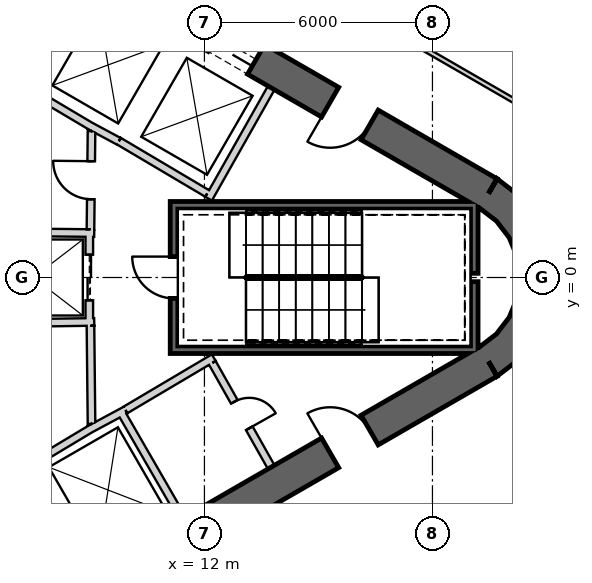
"""IFC4 building model, lengths in metres.
Left out: names, types, materials, properties, quantities, classifications, styles, units other than length and angle.
Written with IfcOpenShell. Run it as: python <this file> out.ifc"""

import sys

from ifc_helpers import new_model, si_unit, direction, frame, frame_2d, origin, place, context, subcontext, project, spatial, polyline, rectangle, outline, extrude, element, fill, save


model = new_model("IFC4")
c1 = context("Model", 3, precision=1e-05, world=origin(), true_north=direction((0.0, 1.0)))
c2 = subcontext(c1, "Body", "Model", "MODEL_VIEW")
j1 = project(units=[si_unit("LENGTHUNIT", "METRE"), si_unit("PLANEANGLEUNIT", "RADIAN")], contexts=[c1])
p1 = place(None, origin())
s1 = spatial("IfcSite", under=j1, at=p1, CompositionType="ELEMENT")
p2 = place(p1, origin())
s2 = spatial("IfcBuilding", under=s1, at=p2, CompositionType="ELEMENT")
p3 = place(p2, frame((0.0, 0.0, 33.5)))
s3 = spatial("IfcBuildingStorey", under=s2, at=p3, CompositionType="ELEMENT", Elevation=33.5)
p4 = place(p3, frame((19.475, 2.208, 0.0), z_axis=(0.0, 0.0, 1.0), x_axis=(-0.866028369851, 0.499994862586, 0.0)))
e1 = element("IfcWall", 1, at=p4, inside=s3, PredefinedType="SHEAR", context=c2, shape_type="SweptSolid", body=[
    extrude(rectangle(XDim=31.523, YDim=0.9, at=frame_2d((15.762, 0.0))), origin(), (0.0, 0.0, 1.0), 6.0),
])
p5 = place(p4, frame((7.062, 0.0, 0.0)))
e2 = element("IfcOpeningElement", 2, at=p5, cuts=e1, PredefinedType="OPENING", context=c2, shape_type="SweptSolid", body=[
    extrude(rectangle(XDim=1.2, YDim=2.4, at=frame_2d((0.6, 1.2))), frame((0.0, 0.46, 0.0), z_axis=(0.0, -1.0, 0.0), x_axis=(1.0, 0.0, 0.0)), (0.0, 0.0, 1.0), 0.92),
])
p6 = place(p4, frame((9.762, 0.0, 0.0)))
e3 = element("IfcOpeningElement", 3, at=p6, cuts=e1, PredefinedType="OPENING", context=c2, shape_type="SweptSolid", body=[
    extrude(rectangle(XDim=1.2, YDim=2.4, at=frame_2d((0.6, 1.2))), frame((0.0, 0.46, 0.0), z_axis=(0.0, -1.0, 0.0), x_axis=(1.0, 0.0, 0.0)), (0.0, 0.0, 1.0), 0.92),
])
p7 = place(p4, frame((12.462, 0.0, 0.0)))
e4 = element("IfcOpeningElement", 4, at=p7, cuts=e1, PredefinedType="OPENING", context=c2, shape_type="SweptSolid", body=[
    extrude(rectangle(XDim=1.2, YDim=2.4, at=frame_2d((0.6, 1.2))), frame((0.0, 0.46, 0.0), z_axis=(0.0, -1.0, 0.0), x_axis=(1.0, 0.0, 0.0)), (0.0, 0.0, 1.0), 0.92),
])
p8 = place(p4, frame((15.162, 0.0, 0.0)))
e5 = element("IfcOpeningElement", 5, at=p8, cuts=e1, PredefinedType="OPENING", context=c2, shape_type="SweptSolid", body=[
    extrude(rectangle(XDim=1.2, YDim=2.4, at=frame_2d((0.6, 1.2))), frame((0.0, 0.46, 0.0), z_axis=(0.0, -1.0, 0.0), x_axis=(1.0, 0.0, 0.0)), (0.0, 0.0, 1.0), 0.92),
])
p9 = place(p4, frame((17.862, 0.0, 0.0)))
e6 = element("IfcOpeningElement", 6, at=p9, cuts=e1, PredefinedType="OPENING", context=c2, shape_type="SweptSolid", body=[
    extrude(rectangle(XDim=1.2, YDim=2.4, at=frame_2d((0.6, 1.2))), frame((0.0, 0.46, 0.0), z_axis=(0.0, -1.0, 0.0), x_axis=(1.0, 0.0, 0.0)), (0.0, 0.0, 1.0), 0.92),
])
p10 = place(p4, frame((20.562, 0.0, 0.0)))
e7 = element("IfcOpeningElement", 7, at=p10, cuts=e1, PredefinedType="OPENING", context=c2, shape_type="SweptSolid", body=[
    extrude(rectangle(XDim=1.2, YDim=2.4, at=frame_2d((0.6, 1.2))), frame((0.0, 0.46, 0.0), z_axis=(0.0, -1.0, 0.0), x_axis=(1.0, 0.0, 0.0)), (0.0, 0.0, 1.0), 0.92),
])
p11 = place(p4, frame((23.262, 0.0, 0.0)))
e8 = element("IfcOpeningElement", 8, at=p11, cuts=e1, PredefinedType="OPENING", context=c2, shape_type="SweptSolid", body=[
    extrude(rectangle(XDim=1.2, YDim=2.4, at=frame_2d((0.6, 1.2))), frame((0.0, 0.46, 0.0), z_axis=(0.0, -1.0, 0.0), x_axis=(1.0, 0.0, 0.0)), (0.0, 0.0, 1.0), 0.92),
])
p12 = place(p4, frame((3.612, 0.0, 0.0)))
e9 = element("IfcOpeningElement", 9, at=p12, cuts=e1, PredefinedType="OPENING", context=c2, shape_type="SweptSolid", body=[
    extrude(rectangle(XDim=1.2, YDim=2.4, at=frame_2d((0.6, 1.2))), frame((0.0, 0.46, 0.0), z_axis=(0.0, -1.0, 0.0), x_axis=(1.0, 0.0, 0.0)), (0.0, 0.0, 1.0), 0.92),
])
p13 = place(p4, frame((26.712, 0.0, 0.0)))
e10 = element("IfcOpeningElement", 10, at=p13, cuts=e1, PredefinedType="OPENING", context=c2, shape_type="SweptSolid", body=[
    extrude(rectangle(XDim=1.2, YDim=2.4, at=frame_2d((0.6, 1.2))), frame((0.0, 0.46, 0.0), z_axis=(0.0, -1.0, 0.0), x_axis=(1.0, 0.0, 0.0)), (0.0, 0.0, 1.0), 0.92),
])
p14 = place(p3, frame((-7.825, -17.97, 0.0), z_axis=(0.0, 0.0, 1.0), x_axis=(0.866028369851, 0.499994862586, 0.0)))
e11 = element("IfcWall", 11, at=p14, inside=s3, PredefinedType="SHEAR", context=c2, shape_type="SweptSolid", body=[
    extrude(rectangle(XDim=31.523, YDim=0.9, at=frame_2d((15.762, 0.0))), origin(), (0.0, 0.0, 1.0), 6.0),
])
p15 = place(p14, frame((7.062, 0.0, 0.0)))
e12 = element("IfcOpeningElement", 12, at=p15, cuts=e11, PredefinedType="OPENING", context=c2, shape_type="SweptSolid", body=[
    extrude(rectangle(XDim=1.2, YDim=2.4, at=frame_2d((0.6, 1.2))), frame((0.0, 0.46, 0.0), z_axis=(0.0, -1.0, 0.0), x_axis=(1.0, 0.0, 0.0)), (0.0, 0.0, 1.0), 0.92),
])
p16 = place(p14, frame((9.762, 0.0, 0.0)))
e13 = element("IfcOpeningElement", 13, at=p16, cuts=e11, PredefinedType="OPENING", context=c2, shape_type="SweptSolid", body=[
    extrude(rectangle(XDim=1.2, YDim=2.4, at=frame_2d((0.6, 1.2))), frame((0.0, 0.46, 0.0), z_axis=(0.0, -1.0, 0.0), x_axis=(1.0, 0.0, 0.0)), (0.0, 0.0, 1.0), 0.92),
])
p17 = place(p14, frame((12.462, 0.0, 0.0)))
e14 = element("IfcOpeningElement", 14, at=p17, cuts=e11, PredefinedType="OPENING", context=c2, shape_type="SweptSolid", body=[
    extrude(rectangle(XDim=1.2, YDim=2.4, at=frame_2d((0.6, 1.2))), frame((0.0, 0.46, 0.0), z_axis=(0.0, -1.0, 0.0), x_axis=(1.0, 0.0, 0.0)), (0.0, 0.0, 1.0), 0.92),
])
p18 = place(p14, frame((15.162, 0.0, 0.0)))
e15 = element("IfcOpeningElement", 15, at=p18, cuts=e11, PredefinedType="OPENING", context=c2, shape_type="SweptSolid", body=[
    extrude(rectangle(XDim=1.2, YDim=2.4, at=frame_2d((0.6, 1.2))), frame((0.0, 0.46, 0.0), z_axis=(0.0, -1.0, 0.0), x_axis=(1.0, 0.0, 0.0)), (0.0, 0.0, 1.0), 0.92),
])
p19 = place(p14, frame((17.862, 0.0, 0.0)))
e16 = element("IfcOpeningElement", 16, at=p19, cuts=e11, PredefinedType="OPENING", context=c2, shape_type="SweptSolid", body=[
    extrude(rectangle(XDim=1.2, YDim=2.4, at=frame_2d((0.6, 1.2))), frame((0.0, 0.46, 0.0), z_axis=(0.0, -1.0, 0.0), x_axis=(1.0, 0.0, 0.0)), (0.0, 0.0, 1.0), 0.92),
])
p20 = place(p14, frame((20.562, 0.0, 0.0)))
e17 = element("IfcOpeningElement", 17, at=p20, cuts=e11, PredefinedType="OPENING", context=c2, shape_type="SweptSolid", body=[
    extrude(rectangle(XDim=1.2, YDim=2.4, at=frame_2d((0.6, 1.2))), frame((0.0, 0.46, 0.0), z_axis=(0.0, -1.0, 0.0), x_axis=(1.0, 0.0, 0.0)), (0.0, 0.0, 1.0), 0.92),
])
p21 = place(p14, frame((26.712, 0.0, 0.0)))
e18 = element("IfcOpeningElement", 18, at=p21, cuts=e11, PredefinedType="OPENING", context=c2, shape_type="SweptSolid", body=[
    extrude(rectangle(XDim=1.2, YDim=2.4, at=frame_2d((0.6, 1.2))), frame((0.0, 0.46, 0.0), z_axis=(0.0, -1.0, 0.0), x_axis=(1.0, 0.0, 0.0)), (0.0, 0.0, 1.0), 0.92),
])
p22 = place(p14, frame((3.612, 0.0, 0.0)))
e19 = element("IfcOpeningElement", 19, at=p22, cuts=e11, PredefinedType="OPENING", context=c2, shape_type="SweptSolid", body=[
    extrude(rectangle(XDim=1.2, YDim=2.4, at=frame_2d((0.6, 1.2))), frame((0.0, 0.46, 0.0), z_axis=(0.0, -1.0, 0.0), x_axis=(1.0, 0.0, 0.0)), (0.0, 0.0, 1.0), 0.92),
])
p23 = place(p3, origin())
e20 = element("IfcWall", 20, at=p23, inside=s3, PredefinedType="SHEAR", context=c2, shape_type="SweptSolid", body=[
    extrude(outline(polyline([(19.7, -2.598), (20.321, -2.121), (20.798, -1.5), (21.098, -0.777), (21.2, 0.0), (21.098, 0.777), (20.798, 1.5), (20.321, 2.121), (19.7, 2.598), (19.25, 1.819), (19.685, 1.485), (20.019, 1.05), (20.229, 0.543), (20.3, 0.0), (20.229, -0.543), (20.019, -1.05), (19.685, -1.485), (19.25, -1.819), (19.7, -2.598)])), origin(), (0.0, 0.0, 1.0), 6.0),
])
p24 = place(p3, frame((12.11, 2.073, 0.0), z_axis=(0.0, 0.0, 1.0), x_axis=(0.49196600604, 0.870614408852, 0.0)))
e21 = element("IfcWall", 21, at=p24, inside=s3, PredefinedType="PLUMBINGWALL", context=c2, shape_type="SweptSolid", body=[
    extrude(rectangle(XDim=3.35, YDim=0.2, at=frame_2d((1.675, 0.0))), origin(), (0.0, 0.0, 1.0), 5.65),
])
p25 = place(p3, frame((12.073, 2.211, 0.0), z_axis=(0.0, 0.0, 1.0), x_axis=(-0.860438357912, 0.509554542943, 0.0)))
e22 = element("IfcWall", 22, at=p25, inside=s3, PredefinedType="PLUMBINGWALL", context=c2, shape_type="SweptSolid", body=[
    extrude(rectangle(XDim=2.7, YDim=0.2, at=frame_2d((1.35, 0.0))), origin(), (0.0, 0.0, 1.0), 5.65),
])
p26 = place(p3, frame((9.748, 3.583, 0.0), z_axis=(0.0, 0.0, 1.0), x_axis=(-0.880917147855, 0.473270513147, 0.0)))
e23 = element("IfcWall", 23, at=p26, inside=s3, PredefinedType="PLUMBINGWALL", context=c2, shape_type="SweptSolid", body=[
    extrude(rectangle(XDim=0.878, YDim=0.2, at=frame_2d((0.439, 0.0))), origin(), (0.0, 0.0, 1.0), 5.65),
])
p27 = place(p3, frame((9.08, 3.937, 0.0), z_axis=(0.0, 0.0, 1.0), x_axis=(-0.859981807212, 0.510324691999, 0.0)))
e24 = element("IfcWall", 24, at=p27, inside=s3, PredefinedType="PLUMBINGWALL", context=c2, shape_type="SweptSolid", body=[
    extrude(rectangle(XDim=1.845, YDim=0.2, at=frame_2d((0.922, 0.0))), origin(), (0.0, 0.0, 1.0), 5.65),
])
p28 = place(p3, frame((9.795, -3.525, 0.0), z_axis=(0.0, 0.0, 1.0), x_axis=(0.499984717929, -0.866034226713, 0.0)))
e25 = element("IfcWall", 25, at=p28, inside=s3, PredefinedType="PLUMBINGWALL", context=c2, shape_type="SweptSolid", body=[
    extrude(rectangle(XDim=3.25, YDim=0.2, at=frame_2d((1.625, 0.0))), origin(), (0.0, 0.0, 1.0), 5.65),
])
p29 = place(p3, frame((8.974, -3.999, 0.0), z_axis=(0.0, 0.0, 1.0), x_axis=(0.880907015104, 0.473289373154, 0.0)))
e26 = element("IfcWall", 26, at=p29, inside=s3, PredefinedType="PLUMBINGWALL", context=c2, shape_type="SweptSolid", body=[
    extrude(rectangle(XDim=1.078, YDim=0.2, at=frame_2d((0.539, 0.0))), origin(), (0.0, 0.0, 1.0), 5.65),
])
p30 = place(p3, frame((7.497, -4.886, 0.0), z_axis=(0.0, 0.0, 1.0), x_axis=(0.857516281273, 0.51445682749, 0.0)))
e27 = element("IfcWall", 27, at=p30, inside=s3, PredefinedType="PLUMBINGWALL", context=c2, shape_type="SweptSolid", body=[
    extrude(rectangle(XDim=1.845, YDim=0.2, at=frame_2d((0.922, 0.0))), origin(), (0.0, 0.0, 1.0), 5.65),
])
p31 = place(p3, frame((19.2, 1.9, -0.3), z_axis=(0.0, 0.0, 1.0), x_axis=(-1.0, 0.0, 0.0)))
e28 = element("IfcWall", 28, at=p31, inside=s3, PredefinedType="SHEAR", context=c2, shape_type="SweptSolid", body=[
    extrude(rectangle(XDim=8.1, YDim=0.2, at=frame_2d((4.05, 0.0))), origin(), (0.0, 0.0, 1.0), 5.95),
])
p32 = place(p3, frame((19.1, -2.0, -0.3), z_axis=(0.0, 0.0, 1.0), x_axis=(0.0, 1.0, 0.0)))
e29 = element("IfcWall", 29, at=p32, inside=s3, PredefinedType="SHEAR", context=c2, shape_type="SweptSolid", body=[
    extrude(rectangle(XDim=1.89, YDim=0.2, at=frame_2d((0.945, 0.0))), origin(), (0.0, 0.0, 1.0), 5.95),
])
p33 = place(p3, frame((19.1, 0.11, -0.3), z_axis=(0.0, 0.0, 1.0), x_axis=(0.0, 1.0, 0.0)))
e30 = element("IfcWall", 30, at=p33, inside=s3, PredefinedType="SHEAR", context=c2, shape_type="SweptSolid", body=[
    extrude(rectangle(XDim=1.69, YDim=0.2, at=frame_2d((0.845, 0.0))), origin(), (0.0, 0.0, 1.0), 5.95),
])
p34 = place(p3, frame((11.1, -1.9, -0.3), z_axis=(0.0, 0.0, 1.0), x_axis=(1.0, 0.0, 0.0)))
e31 = element("IfcWall", 31, at=p34, inside=s3, PredefinedType="SHEAR", context=c2, shape_type="SweptSolid", body=[
    extrude(rectangle(XDim=7.9, YDim=0.2, at=frame_2d((3.95, 0.0))), origin(), (0.0, 0.0, 1.0), 5.95),
])
p35 = place(p3, frame((11.2, -1.8, -0.3), z_axis=(0.0, 0.0, 1.0), x_axis=(0.0, 1.0, 0.0)))
e32 = element("IfcWall", 32, at=p35, inside=s3, PredefinedType="SHEAR", context=c2, shape_type="SweptSolid", body=[
    extrude(rectangle(XDim=3.6, YDim=0.2, at=frame_2d((1.8, 0.0))), origin(), (0.0, 0.0, 1.0), 5.95),
])
p36 = place(p35, frame((1.25, 0.0, 0.3)))
e33 = element("IfcOpeningElement", 33, at=p36, cuts=e32, PredefinedType="OPENING", context=c2, shape_type="SweptSolid", body=[
    extrude(rectangle(XDim=1.1, YDim=2.1, at=frame_2d((0.55, 1.05))), frame((0.0, 0.11, 0.0), z_axis=(0.0, -1.0, 0.0), x_axis=(1.0, 0.0, 0.0)), (0.0, 0.0, 1.0), 0.22),
])
p37 = place(p3, frame((8.97, 1.2, 0.0), z_axis=(0.0, 0.0, 1.0), x_axis=(0.0, -1.0, 0.0)))
e34 = element("IfcWall", 34, at=p37, inside=s3, PredefinedType="PLUMBINGWALL", context=c2, shape_type="SweptSolid", body=[
    extrude(rectangle(XDim=2.4, YDim=0.2, at=frame_2d((1.2, 0.0))), origin(), (0.0, 0.0, 1.0), 5.65),
])
p38 = place(p37, frame((0.6, 0.0, 0.0)))
e35 = element("IfcOpeningElement", 35, at=p38, cuts=e34, PredefinedType="OPENING", context=c2, shape_type="SweptSolid", body=[
    extrude(rectangle(XDim=1.2, YDim=2.4, at=frame_2d((0.6, 1.2))), frame((0.0, 0.11, 0.0), z_axis=(0.0, -1.0, 0.0), x_axis=(1.0, 0.0, 0.0)), (0.0, 0.0, 1.0), 0.22),
])
p39 = place(p3, frame((9.1, -1.168, 0.0), z_axis=(0.0, 0.0, 1.0), x_axis=(-0.999896137355, -0.014412303875, 0.0)))
e36 = element("IfcWall", 36, at=p39, inside=s3, PredefinedType="PLUMBINGWALL", context=c2, shape_type="SweptSolid", body=[
    extrude(rectangle(XDim=2.151, YDim=0.2, at=frame_2d((1.076, 0.0))), origin(), (0.0, 0.0, 1.0), 5.65),
])
p40 = place(p3, frame((9.1, 1.169, 0.0), z_axis=(0.0, 0.0, 1.0), x_axis=(-0.99994990606, 0.010009264196, 0.0)))
e37 = element("IfcWall", 37, at=p40, inside=s3, PredefinedType="PLUMBINGWALL", context=c2, shape_type="SweptSolid", body=[
    extrude(rectangle(XDim=3.0, YDim=0.2, at=frame_2d((1.5, 0.0))), origin(), (0.0, 0.0, 1.0), 5.65),
])
p41 = place(p3, frame((12.245, -2.109, 0.0), z_axis=(0.0, 0.0, 1.0), x_axis=(-0.860414880418, -0.509594185166, 0.0)))
e38 = element("IfcWall", 38, at=p41, inside=s3, PredefinedType="PARTITIONING", context=c2, shape_type="SweptSolid", body=[
    extrude(rectangle(XDim=2.7, YDim=0.2, at=frame_2d((1.35, 0.0))), origin(), (0.0, 0.0, 1.0), 5.65),
])
p42 = place(p3, frame((13.758, -4.99, 0.0), z_axis=(0.0, 0.0, 1.0), x_axis=(-0.491993409184, 0.87059892334, 0.0)))
e39 = element("IfcWall", 39, at=p42, inside=s3, PredefinedType="PARTITIONING", context=c2, shape_type="SweptSolid", body=[
    extrude(rectangle(XDim=3.15, YDim=0.2, at=frame_2d((1.575, 0.0))), origin(), (0.0, 0.0, 1.0), 5.65),
])
p43 = place(p42, frame((1.175, 0.0, 0.0)))
e40 = element("IfcOpeningElement", 40, at=p43, cuts=e39, PredefinedType="OPENING", context=c2, shape_type="SweptSolid", body=[
    extrude(rectangle(XDim=0.8, YDim=2.1, at=frame_2d((0.4, 1.05))), frame((0.0, 0.11, 0.0), z_axis=(0.0, -1.0, 0.0), x_axis=(1.0, 0.0, 0.0)), (0.0, 0.0, 1.0), 0.22),
])
p44 = place(p3, frame((9.029, -3.851, 0.0), z_axis=(0.0, 0.0, 1.0), x_axis=(-0.010784614026, 0.999941844359, 0.0)))
e41 = element("IfcWall", 41, at=p44, inside=s3, PredefinedType="PARTITIONING", context=c2, shape_type="SweptSolid", body=[
    extrude(rectangle(XDim=2.581, YDim=0.2, at=frame_2d((1.291, 0.0))), origin(), (0.0, 0.0, 1.0), 5.65),
])
p45 = place(p3, frame((9.001, 1.27, 0.0), z_axis=(0.0, 0.0, 1.0), x_axis=(0.010783593937, 0.99994185536, 0.0)))
e42 = element("IfcWall", 42, at=p45, inside=s3, PredefinedType="PARTITIONING", context=c2, shape_type="SweptSolid", body=[
    extrude(rectangle(XDim=2.581, YDim=0.2, at=frame_2d((1.291, 0.0))), origin(), (0.0, 0.0, 1.0), 5.65),
])
p46 = place(p45, frame((0.791, 0.0, 0.0)))
e43 = element("IfcOpeningElement", 43, at=p46, cuts=e42, PredefinedType="OPENING", context=c2, shape_type="SweptSolid", body=[
    extrude(rectangle(XDim=1.0, YDim=2.1, at=frame_2d((0.5, 1.05))), frame((0.0, 0.11, 0.0), z_axis=(0.0, -1.0, 0.0), x_axis=(1.0, 0.0, 0.0)), (0.0, 0.0, 1.0), 0.22),
])
p47 = place(p3, frame((21.126, 4.084, 0.0), z_axis=(0.0, 0.0, 1.0), x_axis=(-0.865925898687, 0.500172308292, 0.0)))
e44 = element("IfcWall", 44, at=p47, inside=s3, PredefinedType="PARTITIONING", context=c2, shape_type="SweptSolid", body=[
    extrude(rectangle(XDim=4.713, YDim=0.12, at=frame_2d((2.356, 0.0))), origin(), (0.0, 0.0, 1.0), 4.83),
])
p48 = place(p36, origin())
e45 = element("IfcDoor", 45, at=p48, inside=s3, OperationType="SINGLE_SWING_RIGHT", PredefinedType="USERDEFINED", context=c2, shape_type="SweptSolid", body=[
    extrude(rectangle(XDim=1.1, YDim=2.1, at=frame_2d((0.55, 1.05))), frame((0.0, 0.025, 0.0), z_axis=(0.0, -1.0, 0.0), x_axis=(1.0, 0.0, 0.0)), (0.0, 0.0, 1.0), 0.05),
])
fill(e33, e45)
p49 = place(p46, origin())
e46 = element("IfcDoor", 46, at=p49, inside=s3, OperationType="SINGLE_SWING_RIGHT", PredefinedType="USERDEFINED", context=c2, shape_type="SweptSolid", body=[
    extrude(rectangle(XDim=1.0, YDim=2.1, at=frame_2d((0.5, 1.05))), frame((0.0, 0.025, 0.0), z_axis=(0.0, -1.0, 0.0), x_axis=(1.0, 0.0, 0.0)), (0.0, 0.0, 1.0), 0.05),
])
fill(e43, e46)
p50 = place(p38, origin())
e47 = element("IfcDoor", 47, at=p50, inside=s3, OperationType="SLIDING_TO_LEFT", PredefinedType="USERDEFINED", context=c2, shape_type="SweptSolid", body=[
    extrude(rectangle(XDim=1.2, YDim=2.4, at=frame_2d((0.6, 1.2))), frame((0.0, 0.025, 0.0), z_axis=(0.0, -1.0, 0.0), x_axis=(1.0, 0.0, 0.0)), (0.0, 0.0, 1.0), 0.05),
])
fill(e35, e47)
p51 = place(p43, origin())
e48 = element("IfcDoor", 48, at=p51, inside=s3, OperationType="SINGLE_SWING_LEFT", PredefinedType="USERDEFINED", context=c2, shape_type="SweptSolid", body=[
    extrude(rectangle(XDim=0.8, YDim=2.1, at=frame_2d((0.4, 1.05))), frame((0.0, 0.025, 0.0), z_axis=(0.0, -1.0, 0.0), x_axis=(1.0, 0.0, 0.0)), (0.0, 0.0, 1.0), 0.05),
])
fill(e40, e48)
p52 = place(p5, origin())
e49 = element("IfcDoor", 49, at=p52, inside=s3, OperationType="SLIDING_TO_LEFT", PredefinedType="USERDEFINED", context=c2, shape_type="SweptSolid", body=[
    extrude(rectangle(XDim=1.2, YDim=2.4, at=frame_2d((0.6, 1.2))), frame((0.0, 0.025, 0.0), z_axis=(0.0, -1.0, 0.0), x_axis=(1.0, 0.0, 0.0)), (0.0, 0.0, 1.0), 0.05),
])
fill(e2, e49)
p53 = place(p21, origin())
e50 = element("IfcDoor", 50, at=p53, inside=s3, OperationType="SINGLE_SWING_LEFT", PredefinedType="USERDEFINED", context=c2, shape_type="SweptSolid", body=[
    extrude(rectangle(XDim=1.2, YDim=2.4, at=frame_2d((0.6, 1.2))), frame((0.0, 0.025, 0.0), z_axis=(0.0, -1.0, 0.0), x_axis=(1.0, 0.0, 0.0)), (0.0, 0.0, 1.0), 0.05),
])
fill(e18, e50)
p54 = place(p12, origin())
e51 = element("IfcDoor", 51, at=p54, inside=s3, OperationType="SINGLE_SWING_RIGHT", PredefinedType="USERDEFINED", context=c2, shape_type="SweptSolid", body=[
    extrude(rectangle(XDim=1.2, YDim=2.4, at=frame_2d((0.6, 1.2))), frame((0.0, 0.025, 0.0), z_axis=(0.0, -1.0, 0.0), x_axis=(1.0, 0.0, 0.0)), (0.0, 0.0, 1.0), 0.05),
])
fill(e9, e51)
save(model, sys.argv[1])
